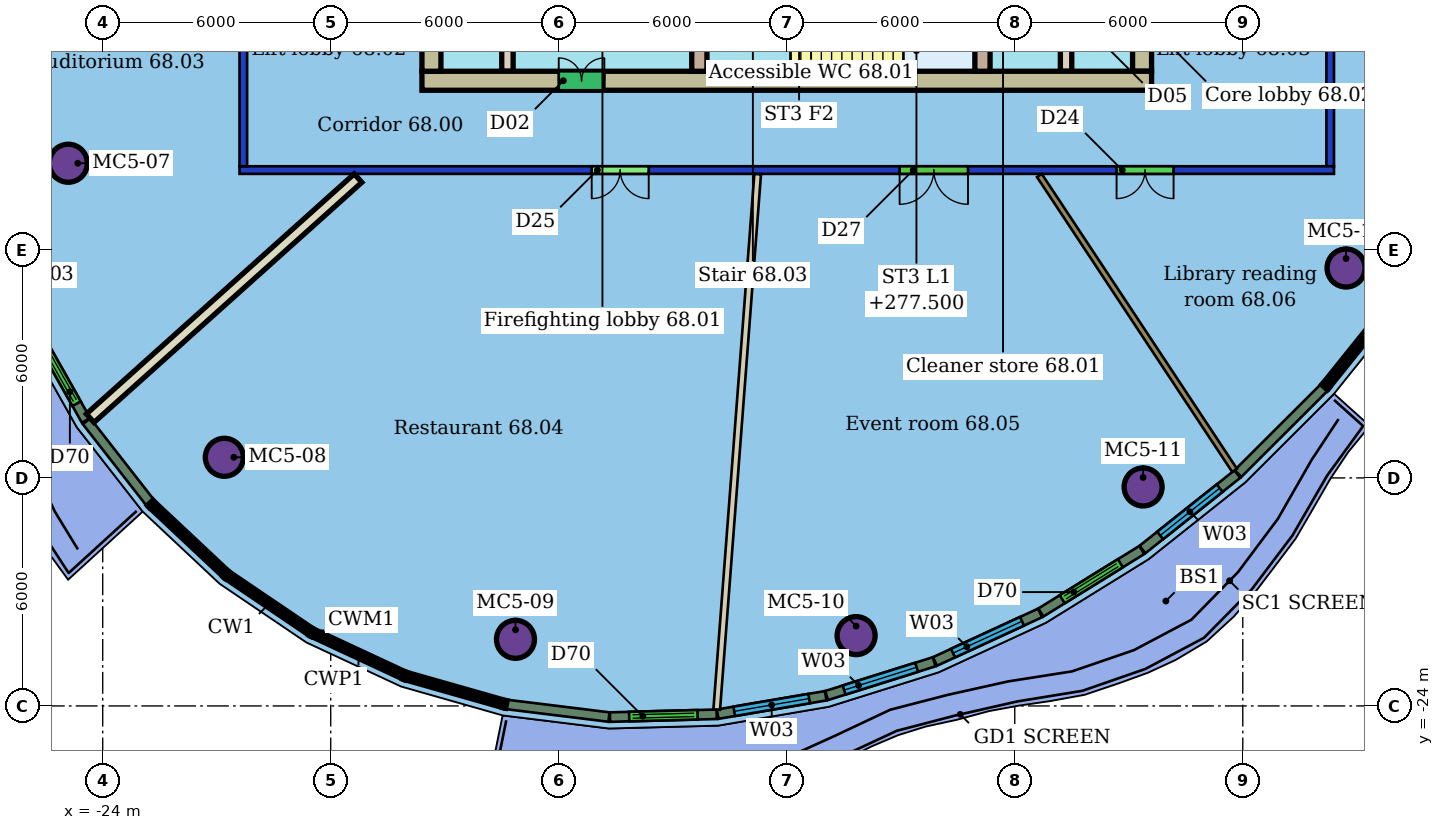
"""IFC4 building model, lengths in metres.
Left out: names, types, materials, properties, quantities, classifications, styles, units other than length and angle.
Written with IfcOpenShell. Run it as: python <this file> out.ifc"""

import sys

from ifc_helpers import new_model, si_unit, direction, frame, frame_2d, origin, origin_2d, place, context, subcontext, project, spatial, rectangle, hollow_circle, extrude, element, fill, save


model = new_model("IFC4")
c1 = context("Model", 3, precision=1e-05, world=origin(), true_north=direction((0.0, 1.0)))
c2 = subcontext(c1, "Body", "Model", "MODEL_VIEW")
j1 = project(units=[si_unit("LENGTHUNIT", "METRE"), si_unit("PLANEANGLEUNIT", "RADIAN")], contexts=[c1])
p1 = place(None, origin())
s1 = spatial("IfcSite", under=j1, at=p1, CompositionType="ELEMENT")
p2 = place(p1, origin())
s2 = spatial("IfcBuilding", under=s1, at=p2, CompositionType="ELEMENT")
p3 = place(p2, frame((0.0, 0.0, 275.7)))
s3 = spatial("IfcBuildingStorey", under=s2, at=p3, CompositionType="ELEMENT", Elevation=275.7)
for number, where, z_axis, x_axis in (
    (1, (-24.906, -9.72, 0.0), (0.0, 0.0, 1.0), (1.0, 0.0, 0.0)),
    (2, (-20.8, -17.457, 0.0), (0.0, 0.0, 1.0), (1.0, 0.0, 0.0)),
    (3, (-13.138, -22.247, 0.0), (0.0, 0.0, 1.0), (1.0, 0.0, 0.0)),
    (4, (-4.175, -22.149, 0.0), (0.0, 0.0, 1.0), (1.0, 0.0, 0.0)),
    (5, (3.377, -18.238, 0.0), (0.0, 0.0, 1.0), (1.0, 0.0, 0.0)),
    (6, (8.718, -12.477, 0.0), (0.0, 0.0, 1.0), (1.0, 0.0, 0.0)),
):
    element("IfcColumn", number, at=place(p3, frame(where, z_axis=z_axis, x_axis=x_axis)), inside=s3, PredefinedType="COLUMN", context=c2, shape_type="SweptSolid", body=[
        extrude(hollow_circle(Radius=0.5, WallThickness=0.04, at=origin_2d()), origin(), (0.0, 0.0, 1.0), 3.45),
    ])
p4 = place(p3, frame((8.4, -9.9, 0.0), z_axis=(0.0, 0.0, 1.0), x_axis=(-1.0, 0.0, 0.0)))
e7 = element("IfcWall", 7, at=p4, inside=s3, PredefinedType="PARTITIONING", context=c2, shape_type="SweptSolid", body=[
    extrude(rectangle(XDim=28.8, YDim=0.2, at=frame_2d((14.4, 0.0))), origin(), (0.0, 0.0, 1.0), 3.1),
])
p5 = place(p4, frame((18.032, 0.0, 0.0)))
e8 = element("IfcOpeningElement", 8, at=p5, cuts=e7, PredefinedType="OPENING", context=c2, shape_type="SweptSolid", body=[
    extrude(rectangle(XDim=1.5, YDim=2.4, at=frame_2d((0.75, 1.2))), frame((0.0, 0.11, 0.0), z_axis=(0.0, -1.0, 0.0), x_axis=(1.0, 0.0, 0.0)), (0.0, 0.0, 1.0), 0.22),
])
p6 = place(p4, frame((9.63, 0.0, 0.0)))
e9 = element("IfcOpeningElement", 9, at=p6, cuts=e7, PredefinedType="OPENING", context=c2, shape_type="SweptSolid", body=[
    extrude(rectangle(XDim=1.8, YDim=2.4, at=frame_2d((0.9, 1.2))), frame((0.0, 0.11, 0.0), z_axis=(0.0, -1.0, 0.0), x_axis=(1.0, 0.0, 0.0)), (0.0, 0.0, 1.0), 0.22),
])
p7 = place(p4, frame((4.221, 0.0, 0.0)))
e10 = element("IfcOpeningElement", 10, at=p7, cuts=e7, PredefinedType="OPENING", context=c2, shape_type="SweptSolid", body=[
    extrude(rectangle(XDim=1.5, YDim=2.1, at=frame_2d((0.75, 1.05))), frame((0.0, 0.11, 0.0), z_axis=(0.0, -1.0, 0.0), x_axis=(1.0, 0.0, 0.0)), (0.0, 0.0, 1.0), 0.22),
])
p8 = place(p3, frame((-20.3, -9.8, 0.0), z_axis=(0.0, 0.0, 1.0), x_axis=(0.0, 1.0, 0.0)))
e11 = element("IfcWall", 11, at=p8, inside=s3, PredefinedType="PARTITIONING", context=c2, shape_type="SweptSolid", body=[
    extrude(rectangle(XDim=19.6, YDim=0.2, at=frame_2d((9.8, 0.0))), origin(), (0.0, 0.0, 1.0), 3.1),
])
p9 = place(p8, frame((5.788, 0.0, 0.0)))
e12 = element("IfcOpeningElement", 12, at=p9, cuts=e11, PredefinedType="OPENING", context=c2, shape_type="SweptSolid", body=[
    extrude(rectangle(XDim=1.8, YDim=2.4, at=frame_2d((0.9, 1.2))), frame((0.0, 0.11, 0.0), z_axis=(0.0, -1.0, 0.0), x_axis=(1.0, 0.0, 0.0)), (0.0, 0.0, 1.0), 0.22),
])
p10 = place(p3, frame((8.3, 9.8, 0.0), z_axis=(0.0, 0.0, 1.0), x_axis=(0.0, -1.0, 0.0)))
e13 = element("IfcWall", 13, at=p10, inside=s3, PredefinedType="PARTITIONING", context=c2, shape_type="SweptSolid", body=[
    extrude(rectangle(XDim=19.6, YDim=0.2, at=frame_2d((9.8, 0.0))), origin(), (0.0, 0.0, 1.0), 3.1),
])
p11 = place(p10, frame((7.911, 0.0, 0.0)))
e14 = element("IfcOpeningElement", 14, at=p11, cuts=e13, PredefinedType="OPENING", context=c2, shape_type="SweptSolid", body=[
    extrude(rectangle(XDim=1.5, YDim=2.4, at=frame_2d((0.75, 1.2))), frame((0.0, 0.11, 0.0), z_axis=(0.0, -1.0, 0.0), x_axis=(1.0, 0.0, 0.0)), (0.0, 0.0, 1.0), 0.22),
])
p12 = place(p3, frame((-24.329, -16.428, 0.0), z_axis=(0.0, 0.0, 1.0), x_axis=(0.744657419608, 0.667446872359, 0.0)))
e15 = element("IfcWall", 15, at=p12, inside=s3, PredefinedType="PARTITIONING", context=c2, shape_type="SweptSolid", body=[
    extrude(rectangle(XDim=9.464, YDim=0.3, at=frame_2d((4.732, 0.0))), origin(), (0.0, 0.0, 1.0), 3.45),
])
p13 = place(p3, frame((-7.843, -24.094, 0.0), z_axis=(0.0, 0.0, 1.0), x_axis=(0.076239282813, 0.99708955052, 0.0)))
e16 = element("IfcWall", 16, at=p13, inside=s3, PredefinedType="PARTITIONING", context=c2, shape_type="SweptSolid", body=[
    extrude(rectangle(XDim=14.128, YDim=0.175, at=frame_2d((7.064, 0.0))), origin(), (0.0, 0.0, 1.0), 3.45),
])
p14 = place(p3, frame((5.783, -17.799, 0.0), z_axis=(0.0, 0.0, 1.0), x_axis=(-0.552020671297, 0.833830425483, 0.0)))
e17 = element("IfcWall", 17, at=p14, inside=s3, PredefinedType="PARTITIONING", context=c2, shape_type="SweptSolid", body=[
    extrude(rectangle(XDim=9.303, YDim=0.15, at=frame_2d((4.652, 0.0))), origin(), (0.0, 0.0, 1.0), 3.45),
])
p15 = place(p3, frame((-25.82, -14.04, 0.0), z_axis=(0.0, 0.0, 1.0), x_axis=(0.491498689368, -0.870878314318, 0.0)))
e18 = element("IfcWall", 18, at=p15, inside=s3, PredefinedType="SOLIDWALL", context=c2, shape_type="SweptSolid", body=[
    extrude(rectangle(XDim=2.809, YDim=0.25, at=frame_2d((1.405, 0.0))), origin(), (0.0, 0.0, 1.0), 3.15),
])
p16 = place(p15, frame((0.505, 0.0, 0.0)))
e19 = element("IfcOpeningElement", 19, at=p16, cuts=e18, PredefinedType="OPENING", context=c2, shape_type="SweptSolid", body=[
    extrude(rectangle(XDim=1.8, YDim=2.4, at=frame_2d((0.9, 1.2))), frame((0.0, 0.135, 0.0), z_axis=(0.0, -1.0, 0.0), x_axis=(1.0, 0.0, 0.0)), (0.0, 0.0, 1.0), 0.27),
])
p17 = place(p3, frame((-24.425, -16.508, 0.0), z_axis=(0.0, 0.0, 1.0), x_axis=(0.615339251215, -0.788262396613, 0.0)))
e20 = element("IfcWall", 20, at=p17, inside=s3, PredefinedType="SOLIDWALL", context=c2, shape_type="SweptSolid", body=[
    extrude(rectangle(XDim=2.705, YDim=0.25, at=frame_2d((1.353, 0.0))), origin(), (0.0, 0.0, 1.0), 3.15),
])
p18 = place(p3, frame((-13.363, -23.962, 0.0), z_axis=(0.0, 0.0, 1.0), x_axis=(0.992517574304, -0.122101861978, 0.0)))
e21 = element("IfcWall", 21, at=p18, inside=s3, PredefinedType="SOLIDWALL", context=c2, shape_type="SweptSolid", body=[
    extrude(rectangle(XDim=2.705, YDim=0.25, at=frame_2d((1.353, 0.0))), origin(), (0.0, 0.0, 1.0), 3.15),
])
p19 = place(p3, frame((-10.651, -24.293, 0.0), z_axis=(0.0, 0.0, 1.0), x_axis=(0.999646299505, 0.026594658985, 0.0)))
e22 = element("IfcWall", 22, at=p19, inside=s3, PredefinedType="SOLIDWALL", context=c2, shape_type="SweptSolid", body=[
    extrude(rectangle(XDim=2.809, YDim=0.25, at=frame_2d((1.405, 0.0))), origin(), (0.0, 0.0, 1.0), 3.15),
])
p20 = place(p19, frame((0.505, 0.0, 0.0)))
e23 = element("IfcOpeningElement", 23, at=p20, cuts=e22, PredefinedType="OPENING", context=c2, shape_type="SweptSolid", body=[
    extrude(rectangle(XDim=1.8, YDim=2.4, at=frame_2d((0.9, 1.2))), frame((0.0, 0.135, 0.0), z_axis=(0.0, -1.0, 0.0), x_axis=(1.0, 0.0, 0.0)), (0.0, 0.0, 1.0), 0.27),
])
p21 = place(p3, frame((-7.818, -24.216, 0.0), z_axis=(0.0, 0.0, 1.0), x_axis=(0.985778528765, 0.1680496719, 0.0)))
e24 = element("IfcWall", 24, at=p21, inside=s3, PredefinedType="SOLIDWALL", context=c2, shape_type="SweptSolid", body=[
    extrude(rectangle(XDim=2.884, YDim=0.25, at=frame_2d((1.442, 0.0))), origin(), (0.0, 0.0, 1.0), 3.15),
])
p22 = place(p21, frame((0.442, 0.0, 0.9)))
e25 = element("IfcOpeningElement", 25, at=p22, cuts=e24, PredefinedType="OPENING", context=c2, shape_type="SweptSolid", body=[
    extrude(rectangle(XDim=2.0, YDim=2.1, at=frame_2d((1.0, 1.05))), frame((0.0, 0.135, 0.0), z_axis=(0.0, -1.0, 0.0), x_axis=(1.0, 0.0, 0.0)), (0.0, 0.0, 1.0), 0.27),
])
p23 = place(p3, frame((-4.951, -23.726, 0.0), z_axis=(0.0, 0.0, 1.0), x_axis=(0.954126194686, 0.299404750486, 0.0)))
e26 = element("IfcWall", 26, at=p23, inside=s3, PredefinedType="SOLIDWALL", context=c2, shape_type="SweptSolid", body=[
    extrude(rectangle(XDim=2.965, YDim=0.25, at=frame_2d((1.482, 0.0))), origin(), (0.0, 0.0, 1.0), 3.15),
])
p24 = place(p23, frame((0.482, 0.0, 0.9)))
e27 = element("IfcOpeningElement", 27, at=p24, cuts=e26, PredefinedType="OPENING", context=c2, shape_type="SweptSolid", body=[
    extrude(rectangle(XDim=2.0, YDim=2.1, at=frame_2d((1.0, 1.05))), frame((0.0, 0.135, 0.0), z_axis=(0.0, -1.0, 0.0), x_axis=(1.0, 0.0, 0.0)), (0.0, 0.0, 1.0), 0.27),
])
p25 = place(p3, frame((-2.099, -22.83, 0.0), z_axis=(0.0, 0.0, 1.0), x_axis=(0.907907770621, 0.419169989438, 0.0)))
e28 = element("IfcWall", 28, at=p25, inside=s3, PredefinedType="SOLIDWALL", context=c2, shape_type="SweptSolid", body=[
    extrude(rectangle(XDim=3.046, YDim=0.25, at=frame_2d((1.523, 0.0))), origin(), (0.0, 0.0, 1.0), 3.15),
])
p26 = place(p25, frame((0.523, 0.0, 0.9)))
e29 = element("IfcOpeningElement", 29, at=p26, cuts=e28, PredefinedType="OPENING", context=c2, shape_type="SweptSolid", body=[
    extrude(rectangle(XDim=2.0, YDim=2.1, at=frame_2d((1.0, 1.05))), frame((0.0, 0.135, 0.0), z_axis=(0.0, -1.0, 0.0), x_axis=(1.0, 0.0, 0.0)), (0.0, 0.0, 1.0), 0.27),
])
p27 = place(p3, frame((0.687, -21.542, 0.0), z_axis=(0.0, 0.0, 1.0), x_axis=(0.850108496559, 0.526607580726, 0.0)))
e30 = element("IfcWall", 30, at=p27, inside=s3, PredefinedType="SOLIDWALL", context=c2, shape_type="SweptSolid", body=[
    extrude(rectangle(XDim=3.123, YDim=0.25, at=frame_2d((1.562, 0.0))), origin(), (0.0, 0.0, 1.0), 3.15),
])
p28 = place(p27, frame((0.661, 0.0, 0.0)))
e31 = element("IfcOpeningElement", 31, at=p28, cuts=e30, PredefinedType="OPENING", context=c2, shape_type="SweptSolid", body=[
    extrude(rectangle(XDim=1.8, YDim=2.4, at=frame_2d((0.9, 1.2))), frame((0.0, 0.135, 0.0), z_axis=(0.0, -1.0, 0.0), x_axis=(1.0, 0.0, 0.0)), (0.0, 0.0, 1.0), 0.27),
])
p29 = place(p3, frame((3.36, -19.884, 0.0), z_axis=(0.0, 0.0, 1.0), x_axis=(0.782888253788, 0.622162343831, 0.0)))
e32 = element("IfcWall", 32, at=p29, inside=s3, PredefinedType="SOLIDWALL", context=c2, shape_type="SweptSolid", body=[
    extrude(rectangle(XDim=3.19, YDim=0.25, at=frame_2d((1.595, 0.0))), origin(), (0.0, 0.0, 1.0), 3.15),
])
p30 = place(p29, frame((0.595, 0.0, 0.9)))
e33 = element("IfcOpeningElement", 33, at=p30, cuts=e32, PredefinedType="OPENING", context=c2, shape_type="SweptSolid", body=[
    extrude(rectangle(XDim=2.0, YDim=2.1, at=frame_2d((1.0, 1.05))), frame((0.0, 0.135, 0.0), z_axis=(0.0, -1.0, 0.0), x_axis=(1.0, 0.0, 0.0)), (0.0, 0.0, 1.0), 0.27),
])
p31 = place(p3, frame((5.874, -17.885, 0.0), z_axis=(0.0, 0.0, 1.0), x_axis=(0.707869406471, 0.706343332511, 0.0)))
e34 = element("IfcWall", 34, at=p31, inside=s3, PredefinedType="SOLIDWALL", context=c2, shape_type="SweptSolid", body=[
    extrude(rectangle(XDim=3.2, YDim=0.25, at=frame_2d((1.6, 0.0))), origin(), (0.0, 0.0, 1.0), 3.15),
])
p32 = place(p3, frame((-15.6, -7.55, 0.0), z_axis=(0.0, 0.0, 1.0), x_axis=(1.0, 0.0, 0.0)))
e35 = element("IfcWall", 35, at=p32, inside=s3, PredefinedType="SHEAR", context=c2, shape_type="SweptSolid", body=[
    extrude(rectangle(XDim=19.2, YDim=0.5, at=frame_2d((9.6, 0.0))), origin(), (0.0, 0.0, 1.0), 3.3),
])
p33 = place(p32, frame((3.6, 0.0, 0.0)))
e36 = element("IfcOpeningElement", 36, at=p33, cuts=e35, PredefinedType="OPENING", context=c2, shape_type="SweptSolid", body=[
    extrude(rectangle(XDim=1.2, YDim=2.1, at=frame_2d((0.6, 1.05))), frame((0.0, 0.26, 0.0), z_axis=(0.0, -1.0, 0.0), x_axis=(1.0, 0.0, 0.0)), (0.0, 0.0, 1.0), 0.52),
])
p34 = place(p3, frame((-15.35, 7.3, 0.0), z_axis=(0.0, 0.0, 1.0), x_axis=(0.0, -1.0, 0.0)))
e37 = element("IfcWall", 37, at=p34, inside=s3, PredefinedType="SHEAR", context=c2, shape_type="SweptSolid", body=[
    extrude(rectangle(XDim=14.6, YDim=0.5, at=frame_2d((7.3, 0.0))), origin(), (0.0, 0.0, 1.0), 3.3),
])
p35 = place(p34, frame((10.6, 0.0, 0.0)))
e38 = element("IfcOpeningElement", 38, at=p35, cuts=e37, PredefinedType="OPENING", context=c2, shape_type="SweptSolid", body=[
    extrude(rectangle(XDim=1.2, YDim=2.1, at=frame_2d((0.6, 1.05))), frame((0.0, 0.26, 0.0), z_axis=(0.0, -1.0, 0.0), x_axis=(1.0, 0.0, 0.0)), (0.0, 0.0, 1.0), 0.52),
])
p36 = place(p34, frame((2.8, 0.0, 0.0)))
e39 = element("IfcOpeningElement", 39, at=p36, cuts=e37, PredefinedType="OPENING", context=c2, shape_type="SweptSolid", body=[
    extrude(rectangle(XDim=1.2, YDim=2.1, at=frame_2d((0.6, 1.05))), frame((0.0, 0.26, 0.0), z_axis=(0.0, -1.0, 0.0), x_axis=(1.0, 0.0, 0.0)), (0.0, 0.0, 1.0), 0.52),
])
p37 = place(p3, frame((3.35, -7.3, 0.0), z_axis=(0.0, 0.0, 1.0), x_axis=(0.0, 1.0, 0.0)))
e40 = element("IfcWall", 40, at=p37, inside=s3, PredefinedType="SHEAR", context=c2, shape_type="SweptSolid", body=[
    extrude(rectangle(XDim=14.6, YDim=0.5, at=frame_2d((7.3, 0.0))), origin(), (0.0, 0.0, 1.0), 3.3),
])
p38 = place(p37, frame((2.8, 0.0, 0.0)))
e41 = element("IfcOpeningElement", 41, at=p38, cuts=e40, PredefinedType="OPENING", context=c2, shape_type="SweptSolid", body=[
    extrude(rectangle(XDim=1.2, YDim=2.1, at=frame_2d((0.6, 1.05))), frame((0.0, 0.26, 0.0), z_axis=(0.0, -1.0, 0.0), x_axis=(1.0, 0.0, 0.0)), (0.0, 0.0, 1.0), 0.52),
])
p39 = place(p37, frame((10.6, 0.0, 0.0)))
e42 = element("IfcOpeningElement", 42, at=p39, cuts=e40, PredefinedType="OPENING", context=c2, shape_type="SweptSolid", body=[
    extrude(rectangle(XDim=1.2, YDim=2.1, at=frame_2d((0.6, 1.05))), frame((0.0, 0.26, 0.0), z_axis=(0.0, -1.0, 0.0), x_axis=(1.0, 0.0, 0.0)), (0.0, 0.0, 1.0), 0.52),
])
p40 = place(p3, frame((-13.35, 7.3, 0.0), z_axis=(0.0, 0.0, 1.0), x_axis=(0.0, -1.0, 0.0)))
e43 = element("IfcWall", 43, at=p40, inside=s3, PredefinedType="SHEAR", context=c2, shape_type="SweptSolid", body=[
    extrude(rectangle(XDim=14.6, YDim=0.3, at=frame_2d((7.3, 0.0))), origin(), (0.0, 0.0, 1.0), 3.3),
])
p41 = place(p40, frame((6.55, 0.0, 0.0)))
e44 = element("IfcOpeningElement", 44, at=p41, cuts=e43, PredefinedType="OPENING", context=c2, shape_type="SweptSolid", body=[
    extrude(rectangle(XDim=1.5, YDim=2.1, at=frame_2d((0.75, 1.05))), frame((0.0, 0.16, 0.0), z_axis=(0.0, -1.0, 0.0), x_axis=(1.0, 0.0, 0.0)), (0.0, 0.0, 1.0), 0.32),
])
p42 = place(p3, frame((1.35, -7.3, 0.0), z_axis=(0.0, 0.0, 1.0), x_axis=(0.0, 1.0, 0.0)))
e45 = element("IfcWall", 45, at=p42, inside=s3, PredefinedType="SHEAR", context=c2, shape_type="SweptSolid", body=[
    extrude(rectangle(XDim=14.6, YDim=0.3, at=frame_2d((7.3, 0.0))), origin(), (0.0, 0.0, 1.0), 3.3),
])
p43 = place(p42, frame((1.21, 0.0, 0.0)))
e46 = element("IfcOpeningElement", 46, at=p43, cuts=e45, PredefinedType="OPENING", context=c2, shape_type="SweptSolid", body=[
    extrude(rectangle(XDim=1.0, YDim=2.1, at=frame_2d((0.5, 1.05))), frame((0.0, 0.16, 0.0), z_axis=(0.0, -1.0, 0.0), x_axis=(1.0, 0.0, 0.0)), (0.0, 0.0, 1.0), 0.32),
])
p44 = place(p42, frame((6.55, 0.0, 0.0)))
e47 = element("IfcOpeningElement", 47, at=p44, cuts=e45, PredefinedType="OPENING", context=c2, shape_type="SweptSolid", body=[
    extrude(rectangle(XDim=1.5, YDim=2.1, at=frame_2d((0.75, 1.05))), frame((0.0, 0.16, 0.0), z_axis=(0.0, -1.0, 0.0), x_axis=(1.0, 0.0, 0.0)), (0.0, 0.0, 1.0), 0.32),
])
p45 = place(p3, frame((-8.3, -3.88, 0.0), z_axis=(0.0, 0.0, 1.0), x_axis=(0.0, -1.0, 0.0)))
e48 = element("IfcWall", 48, at=p45, inside=s3, PredefinedType="SHEAR", context=c2, shape_type="SweptSolid", body=[
    extrude(rectangle(XDim=3.42, YDim=0.4, at=frame_2d((1.71, 0.0))), origin(), (0.0, 0.0, 1.0), 3.3),
])
p46 = place(p45, frame((1.11, 0.0, 0.0)))
e49 = element("IfcOpeningElement", 49, at=p46, cuts=e48, PredefinedType="OPENING", context=c2, shape_type="SweptSolid", body=[
    extrude(rectangle(XDim=1.2, YDim=2.1, at=frame_2d((0.6, 1.05))), frame((0.0, 0.21, 0.0), z_axis=(0.0, -1.0, 0.0), x_axis=(1.0, 0.0, 0.0)), (0.0, 0.0, 1.0), 0.42),
])
p47 = place(p3, frame((-0.85, -3.88, 0.0), z_axis=(0.0, 0.0, 1.0), x_axis=(0.0, -1.0, 0.0)))
e50 = element("IfcWall", 50, at=p47, inside=s3, PredefinedType="SHEAR", context=c2, shape_type="SweptSolid", body=[
    extrude(rectangle(XDim=3.42, YDim=0.4, at=frame_2d((1.71, 0.0))), origin(), (0.0, 0.0, 1.0), 3.3),
])
p48 = place(p5, origin())
e51 = element("IfcDoor", 51, at=p48, inside=s3, OperationType="DOUBLE_DOOR_SINGLE_SWING", PredefinedType="DOOR", context=c2, shape_type="SweptSolid", body=[
    extrude(rectangle(XDim=1.5, YDim=2.4, at=frame_2d((0.75, 1.2))), frame((0.0, 0.025, 0.0), z_axis=(0.0, -1.0, 0.0), x_axis=(1.0, 0.0, 0.0)), (0.0, 0.0, 1.0), 0.05),
])
fill(e8, e51)
p49 = place(p6, origin())
e52 = element("IfcDoor", 52, at=p49, inside=s3, OperationType="DOUBLE_DOOR_SINGLE_SWING", PredefinedType="DOOR", context=c2, shape_type="SweptSolid", body=[
    extrude(rectangle(XDim=1.8, YDim=2.4, at=frame_2d((0.9, 1.2))), frame((0.0, 0.025, 0.0), z_axis=(0.0, -1.0, 0.0), x_axis=(1.0, 0.0, 0.0)), (0.0, 0.0, 1.0), 0.05),
])
fill(e9, e52)
p50 = place(p7, origin())
e53 = element("IfcDoor", 53, at=p50, inside=s3, OperationType="DOUBLE_DOOR_SINGLE_SWING", PredefinedType="DOOR", context=c2, shape_type="SweptSolid", body=[
    extrude(rectangle(XDim=1.5, YDim=2.1, at=frame_2d((0.75, 1.05))), frame((0.0, 0.025, 0.0), z_axis=(0.0, -1.0, 0.0), x_axis=(1.0, 0.0, 0.0)), (0.0, 0.0, 1.0), 0.05),
])
fill(e10, e53)
p51 = place(p16, origin())
e54 = element("IfcDoor", 54, at=p51, inside=s3, OperationType="DOUBLE_DOOR_SLIDING", PredefinedType="DOOR", context=c2, shape_type="SweptSolid", body=[
    extrude(rectangle(XDim=1.8, YDim=2.4, at=frame_2d((0.9, 1.2))), frame((0.0, 0.025, 0.0), z_axis=(0.0, -1.0, 0.0), x_axis=(1.0, 0.0, 0.0)), (0.0, 0.0, 1.0), 0.05),
])
fill(e19, e54)
p52 = place(p20, origin())
e55 = element("IfcDoor", 55, at=p52, inside=s3, OperationType="DOUBLE_DOOR_SLIDING", PredefinedType="DOOR", context=c2, shape_type="SweptSolid", body=[
    extrude(rectangle(XDim=1.8, YDim=2.4, at=frame_2d((0.9, 1.2))), frame((0.0, 0.025, 0.0), z_axis=(0.0, -1.0, 0.0), x_axis=(1.0, 0.0, 0.0)), (0.0, 0.0, 1.0), 0.05),
])
fill(e23, e55)
p53 = place(p22, origin())
e56 = element("IfcWindow", 56, at=p53, inside=s3, PartitioningType="SINGLE_PANEL", PredefinedType="WINDOW", context=c2, shape_type="SweptSolid", body=[
    extrude(rectangle(XDim=2.0, YDim=2.1, at=frame_2d((1.0, 1.05))), frame((0.0, 0.03, 0.0), z_axis=(0.0, -1.0, 0.0), x_axis=(1.0, 0.0, 0.0)), (0.0, 0.0, 1.0), 0.06),
])
fill(e25, e56)
p54 = place(p24, origin())
e57 = element("IfcWindow", 57, at=p54, inside=s3, PartitioningType="SINGLE_PANEL", PredefinedType="WINDOW", context=c2, shape_type="SweptSolid", body=[
    extrude(rectangle(XDim=2.0, YDim=2.1, at=frame_2d((1.0, 1.05))), frame((0.0, 0.03, 0.0), z_axis=(0.0, -1.0, 0.0), x_axis=(1.0, 0.0, 0.0)), (0.0, 0.0, 1.0), 0.06),
])
fill(e27, e57)
p55 = place(p26, origin())
e58 = element("IfcWindow", 58, at=p55, inside=s3, PartitioningType="SINGLE_PANEL", PredefinedType="WINDOW", context=c2, shape_type="SweptSolid", body=[
    extrude(rectangle(XDim=2.0, YDim=2.1, at=frame_2d((1.0, 1.05))), frame((0.0, 0.03, 0.0), z_axis=(0.0, -1.0, 0.0), x_axis=(1.0, 0.0, 0.0)), (0.0, 0.0, 1.0), 0.06),
])
fill(e29, e58)
p56 = place(p28, origin())
e59 = element("IfcDoor", 59, at=p56, inside=s3, OperationType="DOUBLE_DOOR_SLIDING", PredefinedType="DOOR", context=c2, shape_type="SweptSolid", body=[
    extrude(rectangle(XDim=1.8, YDim=2.4, at=frame_2d((0.9, 1.2))), frame((0.0, 0.025, 0.0), z_axis=(0.0, -1.0, 0.0), x_axis=(1.0, 0.0, 0.0)), (0.0, 0.0, 1.0), 0.05),
])
fill(e31, e59)
p57 = place(p30, origin())
e60 = element("IfcWindow", 60, at=p57, inside=s3, PartitioningType="SINGLE_PANEL", PredefinedType="WINDOW", context=c2, shape_type="SweptSolid", body=[
    extrude(rectangle(XDim=2.0, YDim=2.1, at=frame_2d((1.0, 1.05))), frame((0.0, 0.03, 0.0), z_axis=(0.0, -1.0, 0.0), x_axis=(1.0, 0.0, 0.0)), (0.0, 0.0, 1.0), 0.06),
])
fill(e33, e60)
p58 = place(p33, origin())
e61 = element("IfcDoor", 61, at=p58, inside=s3, OperationType="DOUBLE_DOOR_SINGLE_SWING", PredefinedType="NOTDEFINED", context=c2, shape_type="SweptSolid", body=[
    extrude(rectangle(XDim=1.2, YDim=2.1, at=frame_2d((0.6, 1.05))), frame((0.0, 0.025, 0.0), z_axis=(0.0, -1.0, 0.0), x_axis=(1.0, 0.0, 0.0)), (0.0, 0.0, 1.0), 0.05),
])
fill(e36, e61)
save(model, sys.argv[1])
